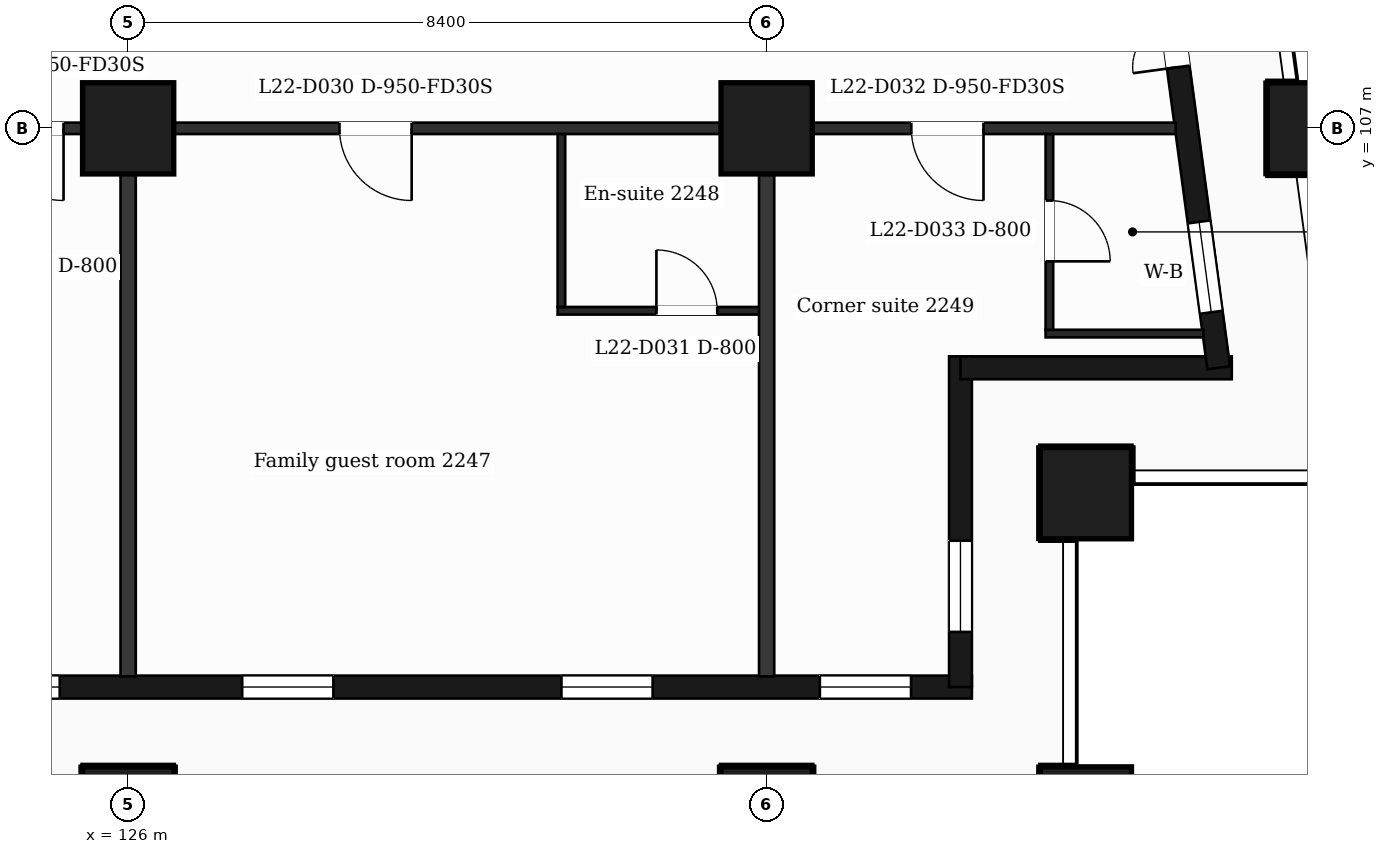
"""IFC4 building model, lengths in metres.
Left out: names, types, materials, properties, quantities, classifications, styles, units other than length and angle.
Written with IfcOpenShell. Run it as: python <this file> out.ifc"""

import sys

from ifc_helpers import new_model, si_unit, direction, frame, frame_2d, origin, origin_2d, place, context, subcontext, project, spatial, rectangle, extrude, element, fill, save


model = new_model("IFC4")
c1 = context("Model", 3, precision=1e-05, world=origin(), true_north=direction((0.0, 1.0)))
c2 = subcontext(c1, "Body", "Model", "MODEL_VIEW")
j1 = project(units=[si_unit("LENGTHUNIT", "METRE"), si_unit("PLANEANGLEUNIT", "RADIAN")], contexts=[c1])
p1 = place(None, origin())
s1 = spatial("IfcSite", under=j1, at=p1, CompositionType="ELEMENT")
p2 = place(p1, origin())
s2 = spatial("IfcBuilding", under=s1, at=p2, CompositionType="ELEMENT")
p3 = place(p2, frame((0.0, 0.0, 98.4)))
s3 = spatial("IfcBuildingStorey", under=s2, at=p3, CompositionType="ELEMENT", Elevation=98.4)
for number, where, z_axis, x_axis in (
    (1, (126.0, 98.0, 0.0), (0.0, 0.0, 1.0), (1.0, 0.0, 0.0)),
    (2, (134.4, 98.0, 0.0), (0.0, 0.0, 1.0), (1.0, 0.0, 0.0)),
    (3, (138.6, 98.0, 0.0), (0.0, 0.0, 1.0), (1.0, 0.0, 0.0)),
    (4, (138.6, 102.2, 0.0), (0.0, 0.0, 1.0), (1.0, 0.0, 0.0)),
    (5, (126.0, 107.0, 0.0), (0.0, 0.0, 1.0), (1.0, 0.0, 0.0)),
    (6, (134.4, 107.0, 0.0), (0.0, 0.0, 1.0), (1.0, 0.0, 0.0)),
    (7, (141.588, 107.0, 0.0), (0.0, 0.0, 1.0), (1.0, 0.0, 0.0)),
):
    element("IfcColumn", number, at=place(p3, frame(where, z_axis=z_axis, x_axis=x_axis)), inside=s3, PredefinedType="COLUMN", context=c2, shape_type="SweptSolid", body=[
        extrude(rectangle(XDim=1.2, YDim=1.2, at=origin_2d()), origin(), (0.0, 0.0, 1.0), 3.7),
    ])
p4 = place(p3, frame((89.85, 99.65, 0.0), z_axis=(0.0, 0.0, 1.0), x_axis=(1.0, 0.0, 0.0)))
e8 = element("IfcWall", 8, at=p4, inside=s3, PredefinedType="SOLIDWALL", context=c2, shape_type="SweptSolid", body=[
    extrude(rectangle(XDim=47.25, YDim=0.3, at=frame_2d((23.625, 0.0))), origin(), (0.0, 0.0, 1.0), 3.38),
])
p5 = place(p4, frame((0.725, 0.0, 0.9)))
e9 = element("IfcOpeningElement", 9, at=p5, cuts=e8, PredefinedType="OPENING", context=c2, shape_type="SweptSolid", body=[
    extrude(rectangle(XDim=1.2, YDim=2.1, at=frame_2d((0.6, 1.05))), frame((0.0, 0.16, 0.0), z_axis=(0.0, -1.0, 0.0), x_axis=(1.0, 0.0, 0.0)), (0.0, 0.0, 1.0), 0.32),
])
p6 = place(p4, frame((3.45, 0.0, 0.9)))
e10 = element("IfcOpeningElement", 10, at=p6, cuts=e8, PredefinedType="OPENING", context=c2, shape_type="SweptSolid", body=[
    extrude(rectangle(XDim=2.4, YDim=2.1, at=frame_2d((1.2, 1.05))), frame((0.0, 0.16, 0.0), z_axis=(0.0, -1.0, 0.0), x_axis=(1.0, 0.0, 0.0)), (0.0, 0.0, 1.0), 0.32),
])
p7 = place(p4, frame((8.25, 0.0, 0.9)))
e11 = element("IfcOpeningElement", 11, at=p7, cuts=e8, PredefinedType="OPENING", context=c2, shape_type="SweptSolid", body=[
    extrude(rectangle(XDim=1.2, YDim=2.1, at=frame_2d((0.6, 1.05))), frame((0.0, 0.16, 0.0), z_axis=(0.0, -1.0, 0.0), x_axis=(1.0, 0.0, 0.0)), (0.0, 0.0, 1.0), 0.32),
])
p8 = place(p4, frame((12.45, 0.0, 0.9)))
e12 = element("IfcOpeningElement", 12, at=p8, cuts=e8, PredefinedType="OPENING", context=c2, shape_type="SweptSolid", body=[
    extrude(rectangle(XDim=1.2, YDim=2.1, at=frame_2d((0.6, 1.05))), frame((0.0, 0.16, 0.0), z_axis=(0.0, -1.0, 0.0), x_axis=(1.0, 0.0, 0.0)), (0.0, 0.0, 1.0), 0.32),
])
p9 = place(p4, frame((16.05, 0.0, 0.9)))
e13 = element("IfcOpeningElement", 13, at=p9, cuts=e8, PredefinedType="OPENING", context=c2, shape_type="SweptSolid", body=[
    extrude(rectangle(XDim=2.4, YDim=2.1, at=frame_2d((1.2, 1.05))), frame((0.0, 0.16, 0.0), z_axis=(0.0, -1.0, 0.0), x_axis=(1.0, 0.0, 0.0)), (0.0, 0.0, 1.0), 0.32),
])
p10 = place(p4, frame((20.25, 0.0, 0.9)))
e14 = element("IfcOpeningElement", 14, at=p10, cuts=e8, PredefinedType="OPENING", context=c2, shape_type="SweptSolid", body=[
    extrude(rectangle(XDim=2.4, YDim=2.1, at=frame_2d((1.2, 1.05))), frame((0.0, 0.16, 0.0), z_axis=(0.0, -1.0, 0.0), x_axis=(1.0, 0.0, 0.0)), (0.0, 0.0, 1.0), 0.32),
])
p11 = place(p4, frame((25.05, 0.0, 0.0)))
e15 = element("IfcOpeningElement", 15, at=p11, cuts=e8, PredefinedType="OPENING", context=c2, shape_type="SweptSolid", body=[
    extrude(rectangle(XDim=1.2, YDim=2.4, at=frame_2d((0.6, 1.2))), frame((0.0, 0.16, 0.0), z_axis=(0.0, -1.0, 0.0), x_axis=(1.0, 0.0, 0.0)), (0.0, 0.0, 1.0), 0.32),
])
p12 = place(p4, frame((28.65, 0.0, 0.9)))
e16 = element("IfcOpeningElement", 16, at=p12, cuts=e8, PredefinedType="OPENING", context=c2, shape_type="SweptSolid", body=[
    extrude(rectangle(XDim=2.4, YDim=2.1, at=frame_2d((1.2, 1.05))), frame((0.0, 0.16, 0.0), z_axis=(0.0, -1.0, 0.0), x_axis=(1.0, 0.0, 0.0)), (0.0, 0.0, 1.0), 0.32),
])
p13 = place(p4, frame((32.85, 0.0, 0.9)))
e17 = element("IfcOpeningElement", 17, at=p13, cuts=e8, PredefinedType="OPENING", context=c2, shape_type="SweptSolid", body=[
    extrude(rectangle(XDim=2.4, YDim=2.1, at=frame_2d((1.2, 1.05))), frame((0.0, 0.16, 0.0), z_axis=(0.0, -1.0, 0.0), x_axis=(1.0, 0.0, 0.0)), (0.0, 0.0, 1.0), 0.32),
])
p14 = place(p4, frame((37.65, 0.0, 0.9)))
e18 = element("IfcOpeningElement", 18, at=p14, cuts=e8, PredefinedType="OPENING", context=c2, shape_type="SweptSolid", body=[
    extrude(rectangle(XDim=1.2, YDim=2.1, at=frame_2d((0.6, 1.05))), frame((0.0, 0.16, 0.0), z_axis=(0.0, -1.0, 0.0), x_axis=(1.0, 0.0, 0.0)), (0.0, 0.0, 1.0), 0.32),
])
p15 = place(p4, frame((41.85, 0.0, 0.9)))
e19 = element("IfcOpeningElement", 19, at=p15, cuts=e8, PredefinedType="OPENING", context=c2, shape_type="SweptSolid", body=[
    extrude(rectangle(XDim=1.2, YDim=2.1, at=frame_2d((0.6, 1.05))), frame((0.0, 0.16, 0.0), z_axis=(0.0, -1.0, 0.0), x_axis=(1.0, 0.0, 0.0)), (0.0, 0.0, 1.0), 0.32),
])
p16 = place(p4, frame((45.25, 0.0, 0.9)))
e20 = element("IfcOpeningElement", 20, at=p16, cuts=e8, PredefinedType="OPENING", context=c2, shape_type="SweptSolid", body=[
    extrude(rectangle(XDim=1.2, YDim=2.1, at=frame_2d((0.6, 1.05))), frame((0.0, 0.16, 0.0), z_axis=(0.0, -1.0, 0.0), x_axis=(1.0, 0.0, 0.0)), (0.0, 0.0, 1.0), 0.32),
])
p17 = place(p3, frame((136.95, 99.65, 0.0), z_axis=(0.0, 0.0, 1.0), x_axis=(0.0, 1.0, 0.0)))
e21 = element("IfcWall", 21, at=p17, inside=s3, PredefinedType="SOLIDWALL", context=c2, shape_type="SweptSolid", body=[
    extrude(rectangle(XDim=4.35, YDim=0.3, at=frame_2d((2.175, 0.0))), origin(), (0.0, 0.0, 1.0), 3.38),
])
p18 = place(p17, frame((0.725, 0.0, 0.9)))
e22 = element("IfcOpeningElement", 22, at=p18, cuts=e21, PredefinedType="OPENING", context=c2, shape_type="SweptSolid", body=[
    extrude(rectangle(XDim=1.2, YDim=2.1, at=frame_2d((0.6, 1.05))), frame((0.0, 0.16, 0.0), z_axis=(0.0, -1.0, 0.0), x_axis=(1.0, 0.0, 0.0)), (0.0, 0.0, 1.0), 0.32),
])
p19 = place(p3, frame((136.95, 103.85, 0.0), z_axis=(0.0, 0.0, 1.0), x_axis=(1.0, 0.0, 0.0)))
e23 = element("IfcWall", 23, at=p19, inside=s3, PredefinedType="SOLIDWALL", context=c2, shape_type="SweptSolid", body=[
    extrude(rectangle(XDim=3.569, YDim=0.3, at=frame_2d((1.785, 0.0))), origin(), (0.0, 0.0, 1.0), 3.38),
])
p20 = place(p3, frame((140.348, 103.85, 0.0), z_axis=(0.0, 0.0, 1.0), x_axis=(-0.133431549479, 0.991058031401, 0.0)))
e24 = element("IfcWall", 24, at=p20, inside=s3, PredefinedType="SOLIDWALL", context=c2, shape_type="SweptSolid", body=[
    extrude(rectangle(XDim=6.609, YDim=0.3, at=frame_2d((3.304, 0.0))), origin(), (0.0, 0.0, 1.0), 3.38),
])
p21 = place(p20, frame((0.737, 0.0, 0.9)))
e25 = element("IfcOpeningElement", 25, at=p21, cuts=e24, PredefinedType="OPENING", context=c2, shape_type="SweptSolid", body=[
    extrude(rectangle(XDim=1.2, YDim=2.1, at=frame_2d((0.6, 1.05))), frame((0.0, 0.16, 0.0), z_axis=(0.0, -1.0, 0.0), x_axis=(1.0, 0.0, 0.0)), (0.0, 0.0, 1.0), 0.32),
])
p22 = place(p20, frame((3.991, 0.0, 0.0)))
e26 = element("IfcOpeningElement", 26, at=p22, cuts=e24, PredefinedType="OPENING", context=c2, shape_type="SweptSolid", body=[
    extrude(rectangle(XDim=1.2, YDim=2.4, at=frame_2d((0.6, 1.2))), frame((0.0, 0.16, 0.0), z_axis=(0.0, -1.0, 0.0), x_axis=(1.0, 0.0, 0.0)), (0.0, 0.0, 1.0), 0.32),
])
p23 = place(p3, frame((138.07, 104.3, 0.0), z_axis=(0.0, 0.0, 1.0), x_axis=(1.0, 0.0, 0.0)))
e27 = element("IfcWall", 27, at=p23, inside=s3, PredefinedType="PARTITIONING", context=c2, shape_type="SweptSolid", body=[
    extrude(rectangle(XDim=2.076, YDim=0.1, at=frame_2d((1.038, 0.0))), origin(), (0.0, 0.0, 1.0), 3.38),
])
p24 = place(p3, frame((131.65, 104.6, 0.0), z_axis=(0.0, 0.0, 1.0), x_axis=(1.0, 0.0, 0.0)))
e28 = element("IfcWall", 28, at=p24, inside=s3, PredefinedType="PARTITIONING", context=c2, shape_type="SweptSolid", body=[
    extrude(rectangle(XDim=2.75, YDim=0.1, at=frame_2d((1.375, 0.0))), origin(), (0.0, 0.0, 1.0), 3.38),
])
p25 = place(p24, frame((1.3, 0.0, 0.0)))
e29 = element("IfcOpeningElement", 29, at=p25, cuts=e28, PredefinedType="OPENING", context=c2, shape_type="SweptSolid", body=[
    extrude(rectangle(XDim=0.8, YDim=2.1, at=frame_2d((0.4, 1.05))), frame((0.0, 0.06, 0.0), z_axis=(0.0, -1.0, 0.0), x_axis=(1.0, 0.0, 0.0)), (0.0, 0.0, 1.0), 0.12),
])
p26 = place(p3, frame((87.018, 107.0, 0.0), z_axis=(0.0, 0.0, 1.0), x_axis=(1.0, 0.0, 0.0)))
e30 = element("IfcWall", 30, at=p26, inside=s3, PredefinedType="PARTITIONING", context=c2, shape_type="SweptSolid", body=[
    extrude(rectangle(XDim=52.765, YDim=0.15, at=frame_2d((26.382, 0.0))), origin(), (0.0, 0.0, 1.0), 3.38),
])
p27 = place(p26, frame((1.276, 0.0, 0.0)))
e31 = element("IfcOpeningElement", 31, at=p27, cuts=e30, PredefinedType="OPENING", context=c2, shape_type="SweptSolid", body=[
    extrude(rectangle(XDim=0.95, YDim=2.1, at=frame_2d((0.475, 1.05))), frame((0.0, 0.085, 0.0), z_axis=(0.0, -1.0, 0.0), x_axis=(1.0, 0.0, 0.0)), (0.0, 0.0, 1.0), 0.17),
])
p28 = place(p26, frame((6.152, 0.0, 0.0)))
e32 = element("IfcOpeningElement", 32, at=p28, cuts=e30, PredefinedType="OPENING", context=c2, shape_type="SweptSolid", body=[
    extrude(rectangle(XDim=0.95, YDim=2.1, at=frame_2d((0.475, 1.05))), frame((0.0, 0.085, 0.0), z_axis=(0.0, -1.0, 0.0), x_axis=(1.0, 0.0, 0.0)), (0.0, 0.0, 1.0), 0.17),
])
p29 = place(p26, frame((14.59, 0.0, 0.0)))
e33 = element("IfcOpeningElement", 33, at=p29, cuts=e30, PredefinedType="OPENING", context=c2, shape_type="SweptSolid", body=[
    extrude(rectangle(XDim=0.95, YDim=2.1, at=frame_2d((0.475, 1.05))), frame((0.0, 0.085, 0.0), z_axis=(0.0, -1.0, 0.0), x_axis=(1.0, 0.0, 0.0)), (0.0, 0.0, 1.0), 0.17),
])
p30 = place(p26, frame((18.257, 0.0, 0.0)))
e34 = element("IfcOpeningElement", 34, at=p30, cuts=e30, PredefinedType="OPENING", context=c2, shape_type="SweptSolid", body=[
    extrude(rectangle(XDim=0.95, YDim=2.1, at=frame_2d((0.475, 1.05))), frame((0.0, 0.085, 0.0), z_axis=(0.0, -1.0, 0.0), x_axis=(1.0, 0.0, 0.0)), (0.0, 0.0, 1.0), 0.17),
])
p31 = place(p26, frame((26.672, 0.0, 0.0)))
e35 = element("IfcOpeningElement", 35, at=p31, cuts=e30, PredefinedType="OPENING", context=c2, shape_type="SweptSolid", body=[
    extrude(rectangle(XDim=0.95, YDim=2.1, at=frame_2d((0.475, 1.05))), frame((0.0, 0.085, 0.0), z_axis=(0.0, -1.0, 0.0), x_axis=(1.0, 0.0, 0.0)), (0.0, 0.0, 1.0), 0.17),
])
p32 = place(p26, frame((31.392, 0.0, 0.0)))
e36 = element("IfcOpeningElement", 36, at=p32, cuts=e30, PredefinedType="OPENING", context=c2, shape_type="SweptSolid", body=[
    extrude(rectangle(XDim=0.95, YDim=2.1, at=frame_2d((0.475, 1.05))), frame((0.0, 0.085, 0.0), z_axis=(0.0, -1.0, 0.0), x_axis=(1.0, 0.0, 0.0)), (0.0, 0.0, 1.0), 0.17),
])
p33 = place(p26, frame((37.182, 0.0, 0.0)))
e37 = element("IfcOpeningElement", 37, at=p33, cuts=e30, PredefinedType="OPENING", context=c2, shape_type="SweptSolid", body=[
    extrude(rectangle(XDim=0.95, YDim=2.1, at=frame_2d((0.475, 1.05))), frame((0.0, 0.085, 0.0), z_axis=(0.0, -1.0, 0.0), x_axis=(1.0, 0.0, 0.0)), (0.0, 0.0, 1.0), 0.17),
])
p34 = place(p26, frame((41.762, 0.0, 0.0)))
e38 = element("IfcOpeningElement", 38, at=p34, cuts=e30, PredefinedType="OPENING", context=c2, shape_type="SweptSolid", body=[
    extrude(rectangle(XDim=0.95, YDim=2.1, at=frame_2d((0.475, 1.05))), frame((0.0, 0.085, 0.0), z_axis=(0.0, -1.0, 0.0), x_axis=(1.0, 0.0, 0.0)), (0.0, 0.0, 1.0), 0.17),
])
p35 = place(p26, frame((49.285, 0.0, 0.0)))
e39 = element("IfcOpeningElement", 39, at=p35, cuts=e30, PredefinedType="OPENING", context=c2, shape_type="SweptSolid", body=[
    extrude(rectangle(XDim=0.95, YDim=2.1, at=frame_2d((0.475, 1.05))), frame((0.0, 0.085, 0.0), z_axis=(0.0, -1.0, 0.0), x_axis=(1.0, 0.0, 0.0)), (0.0, 0.0, 1.0), 0.17),
])
p36 = place(p3, frame((126.0, 99.79, 0.0), z_axis=(0.0, 0.0, 1.0), x_axis=(0.0, 1.0, 0.0)))
e40 = element("IfcWall", 40, at=p36, inside=s3, PredefinedType="PARTITIONING", context=c2, shape_type="SweptSolid", body=[
    extrude(rectangle(XDim=7.135, YDim=0.2, at=frame_2d((3.567, 0.0))), origin(), (0.0, 0.0, 1.0), 3.38),
])
p37 = place(p3, frame((131.7, 104.65, 0.0), z_axis=(0.0, 0.0, 1.0), x_axis=(0.0, 1.0, 0.0)))
e41 = element("IfcWall", 41, at=p37, inside=s3, PredefinedType="PARTITIONING", context=c2, shape_type="SweptSolid", body=[
    extrude(rectangle(XDim=2.275, YDim=0.1, at=frame_2d((1.138, 0.0))), origin(), (0.0, 0.0, 1.0), 3.38),
])
p38 = place(p3, frame((134.4, 99.79, 0.0), z_axis=(0.0, 0.0, 1.0), x_axis=(0.0, 1.0, 0.0)))
e42 = element("IfcWall", 42, at=p38, inside=s3, PredefinedType="PARTITIONING", context=c2, shape_type="SweptSolid", body=[
    extrude(rectangle(XDim=7.135, YDim=0.2, at=frame_2d((3.567, 0.0))), origin(), (0.0, 0.0, 1.0), 3.38),
])
p39 = place(p3, frame((138.12, 104.35, 0.0), z_axis=(0.0, 0.0, 1.0), x_axis=(0.0, 1.0, 0.0)))
e43 = element("IfcWall", 43, at=p39, inside=s3, PredefinedType="PARTITIONING", context=c2, shape_type="SweptSolid", body=[
    extrude(rectangle(XDim=2.575, YDim=0.1, at=frame_2d((1.288, 0.0))), origin(), (0.0, 0.0, 1.0), 3.38),
])
p40 = place(p39, frame((0.9, 0.0, 0.0)))
e44 = element("IfcOpeningElement", 44, at=p40, cuts=e43, PredefinedType="OPENING", context=c2, shape_type="SweptSolid", body=[
    extrude(rectangle(XDim=0.8, YDim=2.1, at=frame_2d((0.4, 1.05))), frame((0.0, 0.06, 0.0), z_axis=(0.0, -1.0, 0.0), x_axis=(1.0, 0.0, 0.0)), (0.0, 0.0, 1.0), 0.12),
])
p41 = place(p13, origin())
e45 = element("IfcWindow", 45, at=p41, inside=s3, PartitioningType="SINGLE_PANEL", PredefinedType="WINDOW", context=c2, shape_type="SweptSolid", body=[
    extrude(rectangle(XDim=2.4, YDim=2.1, at=frame_2d((1.2, 1.05))), frame((0.0, 0.03, 0.0), z_axis=(0.0, -1.0, 0.0), x_axis=(1.0, 0.0, 0.0)), (0.0, 0.0, 1.0), 0.06),
])
fill(e17, e45)
p42 = place(p14, origin())
e46 = element("IfcWindow", 46, at=p42, inside=s3, PartitioningType="SINGLE_PANEL", PredefinedType="WINDOW", context=c2, shape_type="SweptSolid", body=[
    extrude(rectangle(XDim=1.2, YDim=2.1, at=frame_2d((0.6, 1.05))), frame((0.0, 0.03, 0.0), z_axis=(0.0, -1.0, 0.0), x_axis=(1.0, 0.0, 0.0)), (0.0, 0.0, 1.0), 0.06),
])
fill(e18, e46)
p43 = place(p15, origin())
e47 = element("IfcWindow", 47, at=p43, inside=s3, PartitioningType="SINGLE_PANEL", PredefinedType="WINDOW", context=c2, shape_type="SweptSolid", body=[
    extrude(rectangle(XDim=1.2, YDim=2.1, at=frame_2d((0.6, 1.05))), frame((0.0, 0.03, 0.0), z_axis=(0.0, -1.0, 0.0), x_axis=(1.0, 0.0, 0.0)), (0.0, 0.0, 1.0), 0.06),
])
fill(e19, e47)
p44 = place(p16, origin())
e48 = element("IfcWindow", 48, at=p44, inside=s3, PartitioningType="SINGLE_PANEL", PredefinedType="WINDOW", context=c2, shape_type="SweptSolid", body=[
    extrude(rectangle(XDim=1.2, YDim=2.1, at=frame_2d((0.6, 1.05))), frame((0.0, 0.03, 0.0), z_axis=(0.0, -1.0, 0.0), x_axis=(1.0, 0.0, 0.0)), (0.0, 0.0, 1.0), 0.06),
])
fill(e20, e48)
p45 = place(p18, origin())
e49 = element("IfcWindow", 49, at=p45, inside=s3, PartitioningType="SINGLE_PANEL", PredefinedType="WINDOW", context=c2, shape_type="SweptSolid", body=[
    extrude(rectangle(XDim=1.2, YDim=2.1, at=frame_2d((0.6, 1.05))), frame((0.0, 0.03, 0.0), z_axis=(0.0, -1.0, 0.0), x_axis=(1.0, 0.0, 0.0)), (0.0, 0.0, 1.0), 0.06),
])
fill(e22, e49)
p46 = place(p21, origin())
e50 = element("IfcWindow", 50, at=p46, inside=s3, PartitioningType="SINGLE_PANEL", PredefinedType="WINDOW", context=c2, shape_type="SweptSolid", body=[
    extrude(rectangle(XDim=1.2, YDim=2.1, at=frame_2d((0.6, 1.05))), frame((0.0, 0.03, 0.0), z_axis=(0.0, -1.0, 0.0), x_axis=(1.0, 0.0, 0.0)), (0.0, 0.0, 1.0), 0.06),
])
fill(e25, e50)
p47 = place(p22, origin())
e51 = element("IfcDoor", 51, at=p47, inside=s3, OperationType="DOUBLE_DOOR_SINGLE_SWING", PredefinedType="DOOR", context=c2, shape_type="SweptSolid", body=[
    extrude(rectangle(XDim=1.2, YDim=2.4, at=frame_2d((0.6, 1.2))), frame((0.0, 0.025, 0.0), z_axis=(0.0, -1.0, 0.0), x_axis=(1.0, 0.0, 0.0)), (0.0, 0.0, 1.0), 0.05),
])
fill(e26, e51)
p48 = place(p33, origin())
e52 = element("IfcDoor", 52, at=p48, inside=s3, OperationType="SINGLE_SWING_RIGHT", PredefinedType="DOOR", context=c2, shape_type="SweptSolid", body=[
    extrude(rectangle(XDim=0.95, YDim=2.1, at=frame_2d((0.475, 1.05))), frame((0.0, 0.025, 0.0), z_axis=(0.0, -1.0, 0.0), x_axis=(1.0, 0.0, 0.0)), (0.0, 0.0, 1.0), 0.05),
])
fill(e37, e52)
p49 = place(p34, origin())
e53 = element("IfcDoor", 53, at=p49, inside=s3, OperationType="SINGLE_SWING_RIGHT", PredefinedType="DOOR", context=c2, shape_type="SweptSolid", body=[
    extrude(rectangle(XDim=0.95, YDim=2.1, at=frame_2d((0.475, 1.05))), frame((0.0, 0.025, 0.0), z_axis=(0.0, -1.0, 0.0), x_axis=(1.0, 0.0, 0.0)), (0.0, 0.0, 1.0), 0.05),
])
fill(e38, e53)
p50 = place(p25, origin())
e54 = element("IfcDoor", 54, at=p50, inside=s3, OperationType="SINGLE_SWING_LEFT", PredefinedType="DOOR", context=c2, shape_type="SweptSolid", body=[
    extrude(rectangle(XDim=0.8, YDim=2.1, at=frame_2d((0.4, 1.05))), frame((0.0, 0.025, 0.0), z_axis=(0.0, -1.0, 0.0), x_axis=(1.0, 0.0, 0.0)), (0.0, 0.0, 1.0), 0.05),
])
fill(e29, e54)
p51 = place(p35, origin())
e55 = element("IfcDoor", 55, at=p51, inside=s3, OperationType="SINGLE_SWING_RIGHT", PredefinedType="DOOR", context=c2, shape_type="SweptSolid", body=[
    extrude(rectangle(XDim=0.95, YDim=2.1, at=frame_2d((0.475, 1.05))), frame((0.0, 0.025, 0.0), z_axis=(0.0, -1.0, 0.0), x_axis=(1.0, 0.0, 0.0)), (0.0, 0.0, 1.0), 0.05),
])
fill(e39, e55)
p52 = place(p40, origin())
e56 = element("IfcDoor", 56, at=p52, inside=s3, OperationType="SINGLE_SWING_LEFT", PredefinedType="DOOR", context=c2, shape_type="SweptSolid", body=[
    extrude(rectangle(XDim=0.8, YDim=2.1, at=frame_2d((0.4, 1.05))), frame((0.0, 0.025, 0.0), z_axis=(0.0, -1.0, 0.0), x_axis=(1.0, 0.0, 0.0)), (0.0, 0.0, 1.0), 0.05),
])
fill(e44, e56)
save(model, sys.argv[1])
